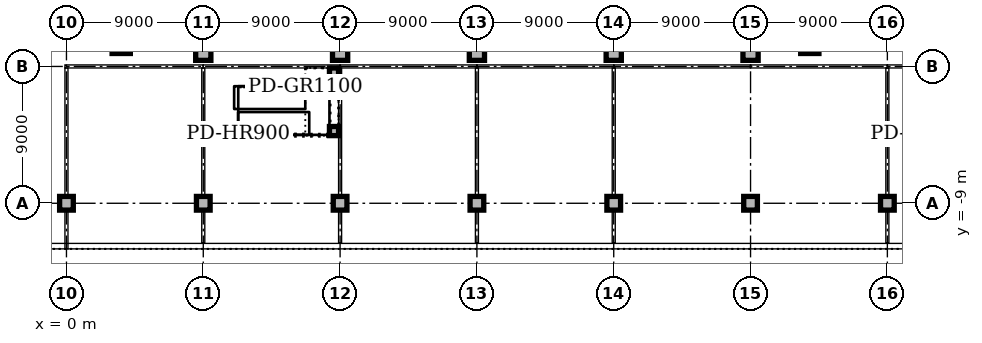
"""IFC4 building model, lengths in metres.
Left out: names, types, materials, properties, quantities, classifications, styles, units other than length and angle.
Written with IfcOpenShell. Run it as: python <this file> out.ifc"""

import sys

from ifc_helpers import new_model, si_unit, direction, frame, frame_2d, origin, origin_2d, place, context, subcontext, project, spatial, rectangle, extrude, element, fill, save


model = new_model("IFC4")
c1 = context("Model", 3, precision=1e-05, world=origin(), true_north=direction((0.0, 1.0)))
c2 = subcontext(c1, "Body", "Model", "MODEL_VIEW")
j1 = project(units=[si_unit("LENGTHUNIT", "METRE"), si_unit("PLANEANGLEUNIT", "RADIAN")], contexts=[c1])
p1 = place(None, origin())
s1 = spatial("IfcSite", under=j1, at=p1, CompositionType="ELEMENT")
p2 = place(p1, origin())
s2 = spatial("IfcBuilding", under=s1, at=p2, CompositionType="ELEMENT")
p3 = place(p2, origin())
s3 = spatial("IfcBuildingStorey", under=s2, at=p3, CompositionType="ELEMENT", Elevation=0.0)
for number, where, z_axis, x_axis in (
    (1, (3.602, 1.453, 0.0), (0.0, 0.0, 1.0), (1.0, 0.0, 0.0)),
    (2, (48.898, 1.453, 0.0), (0.0, 0.0, 1.0), (1.0, 0.0, 0.0)),
):
    element("IfcColumn", number, at=place(p3, frame(where, z_axis=z_axis, x_axis=x_axis)), inside=s3, PredefinedType="COLUMN", context=c2, shape_type="SweptSolid", body=[
        extrude(rectangle(XDim=1.2, YDim=1.2, at=origin_2d()), origin(), (0.0, 0.0, 1.0), 5.7),
    ])
for number, where, z_axis, x_axis in (
    (3, (9.0, 0.9, 0.0), (0.0, 0.0, 1.0), (1.0, 0.0, 0.0)),
    (4, (18.0, 0.9, 0.0), (0.0, 0.0, 1.0), (1.0, 0.0, 0.0)),
    (5, (27.0, 0.9, 0.0), (0.0, 0.0, 1.0), (1.0, 0.0, 0.0)),
    (6, (36.0, 0.9, 0.0), (0.0, 0.0, 1.0), (1.0, 0.0, 0.0)),
    (7, (45.0, 0.9, 0.0), (0.0, 0.0, 1.0), (1.0, 0.0, 0.0)),
):
    element("IfcColumn", number, at=place(p3, frame(where, z_axis=z_axis, x_axis=x_axis)), inside=s3, PredefinedType="COLUMN", context=c2, shape_type="SweptSolid", body=[
        extrude(rectangle(XDim=1.0, YDim=1.0, at=origin_2d()), origin(), (0.0, 0.0, 1.0), 5.7),
    ])
for number, where, z_axis, x_axis in (
    (8, (0.0, -9.0, 0.0), (0.0, 0.0, 1.0), (1.0, 0.0, 0.0)),
    (9, (9.0, -9.0, 0.0), (0.0, 0.0, 1.0), (1.0, 0.0, 0.0)),
    (10, (18.0, -9.0, 0.0), (0.0, 0.0, 1.0), (1.0, 0.0, 0.0)),
    (11, (27.0, -9.0, 0.0), (0.0, 0.0, 1.0), (1.0, 0.0, 0.0)),
    (12, (36.0, -9.0, 0.0), (0.0, 0.0, 1.0), (1.0, 0.0, 0.0)),
    (13, (45.0, -9.0, 0.0), (0.0, 0.0, 1.0), (1.0, 0.0, 0.0)),
    (14, (54.0, -9.0, 0.0), (0.0, 0.0, 1.0), (1.0, 0.0, 0.0)),
):
    element("IfcColumn", number, at=place(p3, frame(where, z_axis=z_axis, x_axis=x_axis)), inside=s3, PredefinedType="COLUMN", context=c2, shape_type="SweptSolid", body=[
        extrude(rectangle(XDim=0.9, YDim=0.9, at=origin_2d()), origin(), (0.0, 0.0, 1.0), 5.7),
    ])
p4 = place(p3, frame((-4.5, -11.82, 0.0), z_axis=(0.0, 0.0, 1.0), x_axis=(1.0, 0.0, 0.0)))
e15 = element("IfcWall", 15, at=p4, inside=s3, PredefinedType="STANDARD", context=c2, shape_type="SweptSolid", body=[
    extrude(rectangle(XDim=67.5, YDim=0.36, at=frame_2d((33.75, 0.0))), origin(), (0.0, 0.0, 1.0), 5.7),
])
p5 = place(p4, frame((1.05, 0.0, 0.0)))
e16 = element("IfcOpeningElement", 16, at=p5, cuts=e15, PredefinedType="OPENING", context=c2, shape_type="SweptSolid", body=[
    extrude(rectangle(XDim=2.4, YDim=2.4, at=frame_2d((1.2, 1.2))), frame((0.0, 0.19, 0.0), z_axis=(0.0, -1.0, 0.0), x_axis=(1.0, 0.0, 0.0)), (0.0, 0.0, 1.0), 0.38),
])
p6 = place(p4, frame((48.3, 0.0, 0.0)))
e17 = element("IfcOpeningElement", 17, at=p6, cuts=e15, PredefinedType="OPENING", context=c2, shape_type="SweptSolid", body=[
    extrude(rectangle(XDim=2.4, YDim=2.4, at=frame_2d((1.2, 1.2))), frame((0.0, 0.19, 0.0), z_axis=(0.0, -1.0, 0.0), x_axis=(1.0, 0.0, 0.0)), (0.0, 0.0, 1.0), 0.38),
])
p7 = place(p4, frame((34.8, 0.0, 0.0)))
e18 = element("IfcOpeningElement", 18, at=p7, cuts=e15, PredefinedType="OPENING", context=c2, shape_type="SweptSolid", body=[
    extrude(rectangle(XDim=2.4, YDim=2.4, at=frame_2d((1.2, 1.2))), frame((0.0, 0.19, 0.0), z_axis=(0.0, -1.0, 0.0), x_axis=(1.0, 0.0, 0.0)), (0.0, 0.0, 1.0), 0.38),
])
p8 = place(p4, frame((7.8, 0.0, 0.0)))
e19 = element("IfcOpeningElement", 19, at=p8, cuts=e15, PredefinedType="OPENING", context=c2, shape_type="SweptSolid", body=[
    extrude(rectangle(XDim=2.4, YDim=2.4, at=frame_2d((1.2, 1.2))), frame((0.0, 0.19, 0.0), z_axis=(0.0, -1.0, 0.0), x_axis=(1.0, 0.0, 0.0)), (0.0, 0.0, 1.0), 0.38),
])
p9 = place(p4, frame((17.1, 0.0, 0.0)))
e20 = element("IfcOpeningElement", 20, at=p9, cuts=e15, PredefinedType="OPENING", context=c2, shape_type="SweptSolid", body=[
    extrude(rectangle(XDim=1.8, YDim=2.2, at=frame_2d((0.9, 1.1))), frame((0.0, 0.19, 0.0), z_axis=(0.0, -1.0, 0.0), x_axis=(1.0, 0.0, 0.0)), (0.0, 0.0, 1.0), 0.38),
])
p10 = place(p4, frame((63.6, 0.0, 0.0)))
e21 = element("IfcOpeningElement", 21, at=p10, cuts=e15, PredefinedType="OPENING", context=c2, shape_type="SweptSolid", body=[
    extrude(rectangle(XDim=1.8, YDim=2.2, at=frame_2d((0.9, 1.1))), frame((0.0, 0.19, 0.0), z_axis=(0.0, -1.0, 0.0), x_axis=(1.0, 0.0, 0.0)), (0.0, 0.0, 1.0), 0.38),
])
p11 = place(p4, frame((11.85, 0.0, 0.6)))
e22 = element("IfcOpeningElement", 22, at=p11, cuts=e15, PredefinedType="OPENING", context=c2, shape_type="SweptSolid", body=[
    extrude(rectangle(XDim=3.3, YDim=3.0, at=frame_2d((1.65, 1.5))), frame((0.0, 0.19, 0.0), z_axis=(0.0, -1.0, 0.0), x_axis=(1.0, 0.0, 0.0)), (0.0, 0.0, 1.0), 0.38),
])
p12 = place(p4, frame((20.85, 0.0, 0.6)))
e23 = element("IfcOpeningElement", 23, at=p12, cuts=e15, PredefinedType="OPENING", context=c2, shape_type="SweptSolid", body=[
    extrude(rectangle(XDim=3.3, YDim=3.0, at=frame_2d((1.65, 1.5))), frame((0.0, 0.19, 0.0), z_axis=(0.0, -1.0, 0.0), x_axis=(1.0, 0.0, 0.0)), (0.0, 0.0, 1.0), 0.38),
])
p13 = place(p4, frame((25.35, 0.0, 0.6)))
e24 = element("IfcOpeningElement", 24, at=p13, cuts=e15, PredefinedType="OPENING", context=c2, shape_type="SweptSolid", body=[
    extrude(rectangle(XDim=3.3, YDim=3.0, at=frame_2d((1.65, 1.5))), frame((0.0, 0.19, 0.0), z_axis=(0.0, -1.0, 0.0), x_axis=(1.0, 0.0, 0.0)), (0.0, 0.0, 1.0), 0.38),
])
p14 = place(p4, frame((29.85, 0.0, 0.6)))
e25 = element("IfcOpeningElement", 25, at=p14, cuts=e15, PredefinedType="OPENING", context=c2, shape_type="SweptSolid", body=[
    extrude(rectangle(XDim=3.3, YDim=3.0, at=frame_2d((1.65, 1.5))), frame((0.0, 0.19, 0.0), z_axis=(0.0, -1.0, 0.0), x_axis=(1.0, 0.0, 0.0)), (0.0, 0.0, 1.0), 0.38),
])
p15 = place(p4, frame((38.85, 0.0, 0.6)))
e26 = element("IfcOpeningElement", 26, at=p15, cuts=e15, PredefinedType="OPENING", context=c2, shape_type="SweptSolid", body=[
    extrude(rectangle(XDim=3.3, YDim=3.0, at=frame_2d((1.65, 1.5))), frame((0.0, 0.19, 0.0), z_axis=(0.0, -1.0, 0.0), x_axis=(1.0, 0.0, 0.0)), (0.0, 0.0, 1.0), 0.38),
])
p16 = place(p4, frame((43.35, 0.0, 0.6)))
e27 = element("IfcOpeningElement", 27, at=p16, cuts=e15, PredefinedType="OPENING", context=c2, shape_type="SweptSolid", body=[
    extrude(rectangle(XDim=3.3, YDim=3.0, at=frame_2d((1.65, 1.5))), frame((0.0, 0.19, 0.0), z_axis=(0.0, -1.0, 0.0), x_axis=(1.0, 0.0, 0.0)), (0.0, 0.0, 1.0), 0.38),
])
p17 = place(p4, frame((52.35, 0.0, 0.6)))
e28 = element("IfcOpeningElement", 28, at=p17, cuts=e15, PredefinedType="OPENING", context=c2, shape_type="SweptSolid", body=[
    extrude(rectangle(XDim=3.3, YDim=3.0, at=frame_2d((1.65, 1.5))), frame((0.0, 0.19, 0.0), z_axis=(0.0, -1.0, 0.0), x_axis=(1.0, 0.0, 0.0)), (0.0, 0.0, 1.0), 0.38),
])
p18 = place(p4, frame((56.85, 0.0, 0.6)))
e29 = element("IfcOpeningElement", 29, at=p18, cuts=e15, PredefinedType="OPENING", context=c2, shape_type="SweptSolid", body=[
    extrude(rectangle(XDim=3.3, YDim=3.0, at=frame_2d((1.65, 1.5))), frame((0.0, 0.19, 0.0), z_axis=(0.0, -1.0, 0.0), x_axis=(1.0, 0.0, 0.0)), (0.0, 0.0, 1.0), 0.38),
])
for number, where, z_axis, x_axis in (
    (30, (17.6, -4.25, 0.0), (0.0, 0.0, 1.0), (1.0, 0.0, 0.0)),
    (31, (17.6, -0.4, 0.0), (0.0, 0.0, 1.0), (1.0, 0.0, 0.0)),
):
    element("IfcColumn", number, at=place(p3, frame(where, z_axis=z_axis, x_axis=x_axis)), inside=s3, PredefinedType="COLUMN", context=c2, shape_type="SweptSolid", body=[
        extrude(rectangle(XDim=0.6, YDim=0.6, at=origin_2d()), origin(), (0.0, 0.0, 1.0), 6.0),
    ])
p19 = place(p3, frame((9.0, 0.0, 0.0), z_axis=(0.0, 0.0, 1.0), x_axis=(1.0, 0.0, 0.0)))
e32 = element("IfcWall", 32, at=p19, inside=s3, PredefinedType="SOLIDWALL", context=c2, shape_type="SweptSolid", body=[
    extrude(rectangle(XDim=9.0, YDim=0.2, at=frame_2d((4.5, 0.0))), origin(), (0.0, 0.0, 1.0), 5.7),
])
p20 = place(p3, frame((9.0, -11.6, 0.0), z_axis=(0.0, 0.0, 1.0), x_axis=(0.0, 1.0, 0.0)))
e33 = element("IfcWall", 33, at=p20, inside=s3, PredefinedType="SOLIDWALL", context=c2, shape_type="SweptSolid", body=[
    extrude(rectangle(XDim=2.13, YDim=0.2, at=frame_2d((1.065, 0.0))), origin(), (0.0, 0.0, 1.0), 5.7),
])
p21 = place(p3, frame((9.0, -8.53, 0.0), z_axis=(0.0, 0.0, 1.0), x_axis=(0.0, 1.0, 0.0)))
e34 = element("IfcWall", 34, at=p21, inside=s3, PredefinedType="SOLIDWALL", context=c2, shape_type="SweptSolid", body=[
    extrude(rectangle(XDim=8.43, YDim=0.2, at=frame_2d((4.215, 0.0))), origin(), (0.0, 0.0, 1.0), 5.7),
])
p22 = place(p3, frame((18.0, -11.6, 0.0), z_axis=(0.0, 0.0, 1.0), x_axis=(0.0, 1.0, 0.0)))
e35 = element("IfcWall", 35, at=p22, inside=s3, PredefinedType="SOLIDWALL", context=c2, shape_type="SweptSolid", body=[
    extrude(rectangle(XDim=2.13, YDim=0.2, at=frame_2d((1.065, 0.0))), origin(), (0.0, 0.0, 1.0), 5.7),
])
p23 = place(p3, frame((18.0, -8.53, 0.0), z_axis=(0.0, 0.0, 1.0), x_axis=(0.0, 1.0, 0.0)))
e36 = element("IfcWall", 36, at=p23, inside=s3, PredefinedType="SOLIDWALL", context=c2, shape_type="SweptSolid", body=[
    extrude(rectangle(XDim=8.43, YDim=0.2, at=frame_2d((4.215, 0.0))), origin(), (0.0, 0.0, 1.0), 5.7),
])
p24 = place(p3, frame((54.0, 0.0, 0.0), z_axis=(0.0, 0.0, 1.0), x_axis=(1.0, 0.0, 0.0)))
e37 = element("IfcWall", 37, at=p24, inside=s3, PredefinedType="SOLIDWALL", context=c2, shape_type="SweptSolid", body=[
    extrude(rectangle(XDim=8.53, YDim=0.2, at=frame_2d((4.265, 0.0))), origin(), (0.0, 0.0, 1.0), 5.7),
])
p25 = place(p3, frame((54.0, -11.6, 0.0), z_axis=(0.0, 0.0, 1.0), x_axis=(0.0, 1.0, 0.0)))
e38 = element("IfcWall", 38, at=p25, inside=s3, PredefinedType="SOLIDWALL", context=c2, shape_type="SweptSolid", body=[
    extrude(rectangle(XDim=2.13, YDim=0.2, at=frame_2d((1.065, 0.0))), origin(), (0.0, 0.0, 1.0), 5.7),
])
p26 = place(p3, frame((54.0, -8.53, 0.0), z_axis=(0.0, 0.0, 1.0), x_axis=(0.0, 1.0, 0.0)))
e39 = element("IfcWall", 39, at=p26, inside=s3, PredefinedType="SOLIDWALL", context=c2, shape_type="SweptSolid", body=[
    extrude(rectangle(XDim=8.43, YDim=0.2, at=frame_2d((4.215, 0.0))), origin(), (0.0, 0.0, 1.0), 5.7),
])
p27 = place(p3, frame((0.0, -12.0, 0.0), z_axis=(0.0, 0.0, 1.0), x_axis=(0.0, 1.0, 0.0)))
e40 = element("IfcWall", 40, at=p27, inside=s3, PredefinedType="PARTITIONING", context=c2, shape_type="SweptSolid", body=[
    extrude(rectangle(XDim=2.53, YDim=0.2, at=frame_2d((1.265, 0.0))), origin(), (0.0, 0.0, 1.0), 5.7),
])
p28 = place(p3, frame((0.0, -8.53, 0.0), z_axis=(0.0, 0.0, 1.0), x_axis=(0.0, 1.0, 0.0)))
e41 = element("IfcWall", 41, at=p28, inside=s3, PredefinedType="PARTITIONING", context=c2, shape_type="SweptSolid", body=[
    extrude(rectangle(XDim=8.43, YDim=0.2, at=frame_2d((4.215, 0.0))), origin(), (0.0, 0.0, 1.0), 5.7),
])
p29 = place(p28, frame((2.03, 0.0, 0.0)))
e42 = element("IfcOpeningElement", 42, at=p29, cuts=e41, PredefinedType="OPENING", context=c2, shape_type="SweptSolid", body=[
    extrude(rectangle(XDim=1.0, YDim=2.1, at=frame_2d((0.5, 1.05))), frame((0.0, 0.11, 0.0), z_axis=(0.0, -1.0, 0.0), x_axis=(1.0, 0.0, 0.0)), (0.0, 0.0, 1.0), 0.22),
])
p30 = place(p3, frame((-0.1, 0.0, 0.0), z_axis=(0.0, 0.0, 1.0), x_axis=(1.0, 0.0, 0.0)))
e43 = element("IfcWall", 43, at=p30, inside=s3, PredefinedType="PARTITIONING", context=c2, shape_type="SweptSolid", body=[
    extrude(rectangle(XDim=9.1, YDim=0.2, at=frame_2d((4.55, 0.0))), origin(), (0.0, 0.0, 1.0), 5.7),
])
p31 = place(p3, frame((18.0, 0.0, 0.0), z_axis=(0.0, 0.0, 1.0), x_axis=(1.0, 0.0, 0.0)))
e44 = element("IfcWall", 44, at=p31, inside=s3, PredefinedType="PARTITIONING", context=c2, shape_type="SweptSolid", body=[
    extrude(rectangle(XDim=9.0, YDim=0.2, at=frame_2d((4.5, 0.0))), origin(), (0.0, 0.0, 1.0), 5.7),
])
p32 = place(p3, frame((27.0, 0.0, 0.0), z_axis=(0.0, 0.0, 1.0), x_axis=(1.0, 0.0, 0.0)))
e45 = element("IfcWall", 45, at=p32, inside=s3, PredefinedType="PARTITIONING", context=c2, shape_type="SweptSolid", body=[
    extrude(rectangle(XDim=9.0, YDim=0.2, at=frame_2d((4.5, 0.0))), origin(), (0.0, 0.0, 1.0), 5.7),
])
p33 = place(p32, frame((4.0, 0.0, 0.0)))
e46 = element("IfcOpeningElement", 46, at=p33, cuts=e45, PredefinedType="OPENING", context=c2, shape_type="SweptSolid", body=[
    extrude(rectangle(XDim=1.0, YDim=2.1, at=frame_2d((0.5, 1.05))), frame((0.0, 0.11, 0.0), z_axis=(0.0, -1.0, 0.0), x_axis=(1.0, 0.0, 0.0)), (0.0, 0.0, 1.0), 0.22),
])
p34 = place(p3, frame((45.0, 0.0, 0.0), z_axis=(0.0, 0.0, 1.0), x_axis=(1.0, 0.0, 0.0)))
e47 = element("IfcWall", 47, at=p34, inside=s3, PredefinedType="PARTITIONING", context=c2, shape_type="SweptSolid", body=[
    extrude(rectangle(XDim=9.0, YDim=0.2, at=frame_2d((4.5, 0.0))), origin(), (0.0, 0.0, 1.0), 5.7),
])
p35 = place(p34, frame((7.7, 0.0, 0.0)))
e48 = element("IfcOpeningElement", 48, at=p35, cuts=e47, PredefinedType="OPENING", context=c2, shape_type="SweptSolid", body=[
    extrude(rectangle(XDim=1.0, YDim=2.1, at=frame_2d((0.5, 1.05))), frame((0.0, 0.11, 0.0), z_axis=(0.0, -1.0, 0.0), x_axis=(1.0, 0.0, 0.0)), (0.0, 0.0, 1.0), 0.22),
])
p36 = place(p3, frame((36.0, 0.0, 0.0), z_axis=(0.0, 0.0, 1.0), x_axis=(1.0, 0.0, 0.0)))
e49 = element("IfcWall", 49, at=p36, inside=s3, PredefinedType="PARTITIONING", context=c2, shape_type="SweptSolid", body=[
    extrude(rectangle(XDim=9.0, YDim=0.2, at=frame_2d((4.5, 0.0))), origin(), (0.0, 0.0, 1.0), 5.7),
])
p37 = place(p3, frame((27.0, -11.6, 0.0), z_axis=(0.0, 0.0, 1.0), x_axis=(0.0, 1.0, 0.0)))
e50 = element("IfcWall", 50, at=p37, inside=s3, PredefinedType="PARTITIONING", context=c2, shape_type="SweptSolid", body=[
    extrude(rectangle(XDim=2.13, YDim=0.2, at=frame_2d((1.065, 0.0))), origin(), (0.0, 0.0, 1.0), 5.7),
])
p38 = place(p3, frame((27.0, -8.53, 0.0), z_axis=(0.0, 0.0, 1.0), x_axis=(0.0, 1.0, 0.0)))
e51 = element("IfcWall", 51, at=p38, inside=s3, PredefinedType="PARTITIONING", context=c2, shape_type="SweptSolid", body=[
    extrude(rectangle(XDim=8.43, YDim=0.2, at=frame_2d((4.215, 0.0))), origin(), (0.0, 0.0, 1.0), 5.7),
])
p39 = place(p38, frame((2.03, 0.0, 0.0)))
e52 = element("IfcOpeningElement", 52, at=p39, cuts=e51, PredefinedType="OPENING", context=c2, shape_type="SweptSolid", body=[
    extrude(rectangle(XDim=1.0, YDim=2.1, at=frame_2d((0.5, 1.05))), frame((0.0, 0.11, 0.0), z_axis=(0.0, -1.0, 0.0), x_axis=(1.0, 0.0, 0.0)), (0.0, 0.0, 1.0), 0.22),
])
p40 = place(p3, frame((36.0, -11.6, 0.0), z_axis=(0.0, 0.0, 1.0), x_axis=(0.0, 1.0, 0.0)))
e53 = element("IfcWall", 53, at=p40, inside=s3, PredefinedType="PARTITIONING", context=c2, shape_type="SweptSolid", body=[
    extrude(rectangle(XDim=2.13, YDim=0.2, at=frame_2d((1.065, 0.0))), origin(), (0.0, 0.0, 1.0), 5.7),
])
p41 = place(p3, frame((36.0, -8.53, 0.0), z_axis=(0.0, 0.0, 1.0), x_axis=(0.0, 1.0, 0.0)))
e54 = element("IfcWall", 54, at=p41, inside=s3, PredefinedType="PARTITIONING", context=c2, shape_type="SweptSolid", body=[
    extrude(rectangle(XDim=8.43, YDim=0.2, at=frame_2d((4.215, 0.0))), origin(), (0.0, 0.0, 1.0), 5.7),
])
p42 = place(p6, frame((2.4, 0.0, 0.0), z_axis=(0.0, 0.0, 1.0), x_axis=(-1.0, 0.0, 0.0)))
e55 = element("IfcDoor", 55, at=p42, inside=s3, OperationType="DOUBLE_DOOR_SINGLE_SWING", PredefinedType="DOOR", context=c2, shape_type="SweptSolid", body=[
    extrude(rectangle(XDim=2.4, YDim=2.4, at=frame_2d((1.2, 1.2))), frame((0.0, -0.07, 0.0), z_axis=(0.0, -1.0, 0.0), x_axis=(1.0, 0.0, 0.0)), (0.0, 0.0, 1.0), 0.05),
])
fill(e17, e55)
p43 = place(p7, frame((2.4, 0.0, 0.0), z_axis=(0.0, 0.0, 1.0), x_axis=(-1.0, 0.0, 0.0)))
e56 = element("IfcDoor", 56, at=p43, inside=s3, OperationType="DOUBLE_DOOR_SINGLE_SWING", PredefinedType="DOOR", context=c2, shape_type="SweptSolid", body=[
    extrude(rectangle(XDim=2.4, YDim=2.4, at=frame_2d((1.2, 1.2))), frame((0.0, -0.07, 0.0), z_axis=(0.0, -1.0, 0.0), x_axis=(1.0, 0.0, 0.0)), (0.0, 0.0, 1.0), 0.05),
])
fill(e18, e56)
p44 = place(p8, frame((2.4, 0.0, 0.0), z_axis=(0.0, 0.0, 1.0), x_axis=(-1.0, 0.0, 0.0)))
e57 = element("IfcDoor", 57, at=p44, inside=s3, OperationType="DOUBLE_DOOR_SINGLE_SWING", PredefinedType="DOOR", context=c2, shape_type="SweptSolid", body=[
    extrude(rectangle(XDim=2.4, YDim=2.4, at=frame_2d((1.2, 1.2))), frame((0.0, -0.07, 0.0), z_axis=(0.0, -1.0, 0.0), x_axis=(1.0, 0.0, 0.0)), (0.0, 0.0, 1.0), 0.05),
])
fill(e19, e57)
p45 = place(p9, frame((1.8, 0.0, 0.0), z_axis=(0.0, 0.0, 1.0), x_axis=(-1.0, 0.0, 0.0)))
e58 = element("IfcDoor", 58, at=p45, inside=s3, OperationType="DOUBLE_DOOR_SINGLE_SWING", PredefinedType="DOOR", context=c2, shape_type="SweptSolid", body=[
    extrude(rectangle(XDim=1.8, YDim=2.2, at=frame_2d((0.9, 1.1))), frame((0.0, -0.07, 0.0), z_axis=(0.0, -1.0, 0.0), x_axis=(1.0, 0.0, 0.0)), (0.0, 0.0, 1.0), 0.05),
])
fill(e20, e58)
p46 = place(p11, origin())
e59 = element("IfcWindow", 59, at=p46, inside=s3, PartitioningType="SINGLE_PANEL", PredefinedType="WINDOW", context=c2, shape_type="SweptSolid", body=[
    extrude(rectangle(XDim=3.3, YDim=3.0, at=frame_2d((1.65, 1.5))), frame((0.0, 0.13, 0.0), z_axis=(0.0, -1.0, 0.0), x_axis=(1.0, 0.0, 0.0)), (0.0, 0.0, 1.0), 0.06),
])
fill(e22, e59)
p47 = place(p12, origin())
e60 = element("IfcWindow", 60, at=p47, inside=s3, PartitioningType="SINGLE_PANEL", PredefinedType="WINDOW", context=c2, shape_type="SweptSolid", body=[
    extrude(rectangle(XDim=3.3, YDim=3.0, at=frame_2d((1.65, 1.5))), frame((0.0, 0.13, 0.0), z_axis=(0.0, -1.0, 0.0), x_axis=(1.0, 0.0, 0.0)), (0.0, 0.0, 1.0), 0.06),
])
fill(e23, e60)
p48 = place(p13, origin())
e61 = element("IfcWindow", 61, at=p48, inside=s3, PartitioningType="SINGLE_PANEL", PredefinedType="WINDOW", context=c2, shape_type="SweptSolid", body=[
    extrude(rectangle(XDim=3.3, YDim=3.0, at=frame_2d((1.65, 1.5))), frame((0.0, 0.13, 0.0), z_axis=(0.0, -1.0, 0.0), x_axis=(1.0, 0.0, 0.0)), (0.0, 0.0, 1.0), 0.06),
])
fill(e24, e61)
p49 = place(p14, origin())
e62 = element("IfcWindow", 62, at=p49, inside=s3, PartitioningType="SINGLE_PANEL", PredefinedType="WINDOW", context=c2, shape_type="SweptSolid", body=[
    extrude(rectangle(XDim=3.3, YDim=3.0, at=frame_2d((1.65, 1.5))), frame((0.0, 0.13, 0.0), z_axis=(0.0, -1.0, 0.0), x_axis=(1.0, 0.0, 0.0)), (0.0, 0.0, 1.0), 0.06),
])
fill(e25, e62)
p50 = place(p15, origin())
e63 = element("IfcWindow", 63, at=p50, inside=s3, PartitioningType="SINGLE_PANEL", PredefinedType="WINDOW", context=c2, shape_type="SweptSolid", body=[
    extrude(rectangle(XDim=3.3, YDim=3.0, at=frame_2d((1.65, 1.5))), frame((0.0, 0.13, 0.0), z_axis=(0.0, -1.0, 0.0), x_axis=(1.0, 0.0, 0.0)), (0.0, 0.0, 1.0), 0.06),
])
fill(e26, e63)
p51 = place(p16, origin())
e64 = element("IfcWindow", 64, at=p51, inside=s3, PartitioningType="SINGLE_PANEL", PredefinedType="WINDOW", context=c2, shape_type="SweptSolid", body=[
    extrude(rectangle(XDim=3.3, YDim=3.0, at=frame_2d((1.65, 1.5))), frame((0.0, 0.13, 0.0), z_axis=(0.0, -1.0, 0.0), x_axis=(1.0, 0.0, 0.0)), (0.0, 0.0, 1.0), 0.06),
])
fill(e27, e64)
p52 = place(p17, origin())
e65 = element("IfcWindow", 65, at=p52, inside=s3, PartitioningType="SINGLE_PANEL", PredefinedType="WINDOW", context=c2, shape_type="SweptSolid", body=[
    extrude(rectangle(XDim=3.3, YDim=3.0, at=frame_2d((1.65, 1.5))), frame((0.0, 0.13, 0.0), z_axis=(0.0, -1.0, 0.0), x_axis=(1.0, 0.0, 0.0)), (0.0, 0.0, 1.0), 0.06),
])
fill(e28, e65)
p53 = place(p18, origin())
e66 = element("IfcWindow", 66, at=p53, inside=s3, PartitioningType="SINGLE_PANEL", PredefinedType="WINDOW", context=c2, shape_type="SweptSolid", body=[
    extrude(rectangle(XDim=3.3, YDim=3.0, at=frame_2d((1.65, 1.5))), frame((0.0, 0.13, 0.0), z_axis=(0.0, -1.0, 0.0), x_axis=(1.0, 0.0, 0.0)), (0.0, 0.0, 1.0), 0.06),
])
fill(e29, e66)
p54 = place(p29, frame((1.0, 0.0, 0.0), z_axis=(0.0, 0.0, 1.0), x_axis=(-1.0, 0.0, 0.0)))
e67 = element("IfcDoor", 67, at=p54, inside=s3, OperationType="SINGLE_SWING_LEFT", PredefinedType="DOOR", context=c2, shape_type="SweptSolid", body=[
    extrude(rectangle(XDim=1.0, YDim=2.1, at=frame_2d((0.5, 1.05))), frame((0.0, 0.025, 0.0), z_axis=(0.0, -1.0, 0.0), x_axis=(1.0, 0.0, 0.0)), (0.0, 0.0, 1.0), 0.05),
])
fill(e42, e67)
p55 = place(p39, origin())
e68 = element("IfcDoor", 68, at=p55, inside=s3, OperationType="SINGLE_SWING_LEFT", PredefinedType="DOOR", context=c2, shape_type="SweptSolid", body=[
    extrude(rectangle(XDim=1.0, YDim=2.1, at=frame_2d((0.5, 1.05))), frame((0.0, 0.025, 0.0), z_axis=(0.0, -1.0, 0.0), x_axis=(1.0, 0.0, 0.0)), (0.0, 0.0, 1.0), 0.05),
])
fill(e52, e68)
p56 = place(p33, frame((1.0, 0.0, 0.0), z_axis=(0.0, 0.0, 1.0), x_axis=(-1.0, 0.0, 0.0)))
e69 = element("IfcDoor", 69, at=p56, inside=s3, OperationType="SINGLE_SWING_LEFT", PredefinedType="DOOR", context=c2, shape_type="SweptSolid", body=[
    extrude(rectangle(XDim=1.0, YDim=2.1, at=frame_2d((0.5, 1.05))), frame((0.0, 0.025, 0.0), z_axis=(0.0, -1.0, 0.0), x_axis=(1.0, 0.0, 0.0)), (0.0, 0.0, 1.0), 0.05),
])
fill(e46, e69)
p57 = place(p35, origin())
e70 = element("IfcDoor", 70, at=p57, inside=s3, OperationType="SINGLE_SWING_RIGHT", PredefinedType="DOOR", context=c2, shape_type="SweptSolid", body=[
    extrude(rectangle(XDim=1.0, YDim=2.1, at=frame_2d((0.5, 1.05))), frame((0.0, 0.025, 0.0), z_axis=(0.0, -1.0, 0.0), x_axis=(1.0, 0.0, 0.0)), (0.0, 0.0, 1.0), 0.05),
])
fill(e48, e70)
save(model, sys.argv[1])
